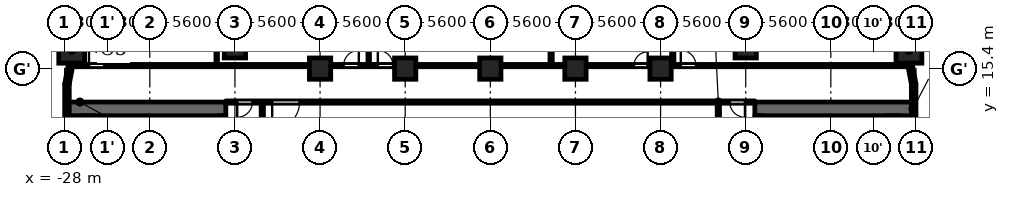
"""IFC4 building model, lengths in metres.
Left out: names, types, materials, properties, quantities, classifications, styles, units other than length and angle.
Written with IfcOpenShell. Run it as: python <this file> out.ifc"""

import sys

from ifc_helpers import new_model, si_unit, direction, frame, frame_2d, origin, origin_2d, place, context, subcontext, project, spatial, rectangle, extrude, element, fill, save


model = new_model("IFC4")
c1 = context("Model", 3, precision=1e-05, world=origin(), true_north=direction((0.0, 1.0)))
c2 = subcontext(c1, "Body", "Model", "MODEL_VIEW")
j1 = project(units=[si_unit("LENGTHUNIT", "METRE"), si_unit("PLANEANGLEUNIT", "RADIAN")], contexts=[c1])
p1 = place(None, origin())
s1 = spatial("IfcSite", under=j1, at=p1, CompositionType="ELEMENT")
p2 = place(p1, origin())
s2 = spatial("IfcBuilding", under=s1, at=p2, CompositionType="ELEMENT")
p3 = place(p2, frame((0.0, 0.0, 25.7)))
s3 = spatial("IfcBuildingStorey", under=s2, at=p3, CompositionType="ELEMENT", Elevation=25.7)
for number, where, z_axis, x_axis in (
    (1, (27.538, 16.609, 0.0), (0.0, 0.0, 1.0), (1.0, 0.0, 0.0)),
    (2, (-27.538, 16.609, 0.0), (0.0, 0.0, 1.0), (1.0, 0.0, 0.0)),
):
    element("IfcColumn", number, at=place(p3, frame(where, z_axis=z_axis, x_axis=x_axis)), inside=s3, PredefinedType="COLUMN", context=c2, shape_type="SweptSolid", body=[
        extrude(rectangle(XDim=1.7, YDim=1.7, at=origin_2d()), origin(), (0.0, 0.0, 1.0), 4.8),
    ])
for number, where, z_axis, x_axis in (
    (3, (-16.8, 16.8, 0.0), (0.0, 0.0, 1.0), (1.0, 0.0, 0.0)),
    (4, (16.8, 16.8, 0.0), (0.0, 0.0, 1.0), (1.0, 0.0, 0.0)),
    (5, (-11.2, 15.4, 0.0), (0.0, 0.0, 1.0), (1.0, 0.0, 0.0)),
    (6, (-5.6, 15.4, 0.0), (0.0, 0.0, 1.0), (1.0, 0.0, 0.0)),
    (7, (0.0, 15.4, 0.0), (0.0, 0.0, 1.0), (1.0, 0.0, 0.0)),
    (8, (5.6, 15.4, 0.0), (0.0, 0.0, 1.0), (1.0, 0.0, 0.0)),
    (9, (11.2, 15.4, 0.0), (0.0, 0.0, 1.0), (1.0, 0.0, 0.0)),
):
    element("IfcColumn", number, at=place(p3, frame(where, z_axis=z_axis, x_axis=x_axis)), inside=s3, PredefinedType="COLUMN", context=c2, shape_type="SweptSolid", body=[
        extrude(rectangle(XDim=1.4, YDim=1.4, at=origin_2d()), origin(), (0.0, 0.0, 1.0), 4.8),
    ])
p4 = place(p3, frame((27.85, 12.05, 0.0), z_axis=(0.0, 0.0, 1.0), x_axis=(0.0, 1.0, 0.0)))
e10 = element("IfcWall", 10, at=p4, inside=s3, PredefinedType="SOLIDWALL", context=c2, shape_type="SweptSolid", body=[
    extrude(rectangle(XDim=2.35, YDim=0.3, at=frame_2d((1.175, 0.0))), origin(), (0.0, 0.0, 1.0), 3.55),
])
for number, where, z_axis, x_axis in (
    (11, (27.853, 14.372, 0.0), (0.0, 0.0, 1.0), (-0.187, 0.982, 0.0)),
    (12, (-27.589, 15.753, 0.0), (0.0, 0.0, 1.0), (-0.187, -0.982, 0.0)),
):
    element("IfcWall", number, at=place(p3, frame(where, z_axis=z_axis, x_axis=x_axis)), inside=s3, PredefinedType="SOLIDWALL", context=c2, shape_type="SweptSolid", body=[
        extrude(rectangle(XDim=1.406, YDim=0.3, at=frame_2d((0.703, 0.0))), origin(), (0.0, 0.0, 1.0), 3.55),
    ])
p5 = place(p3, frame((-27.85, 14.4, 0.0), z_axis=(0.0, 0.0, 1.0), x_axis=(0.0, -1.0, 0.0)))
e13 = element("IfcWall", 13, at=p5, inside=s3, PredefinedType="SOLIDWALL", context=c2, shape_type="SweptSolid", body=[
    extrude(rectangle(XDim=2.35, YDim=0.3, at=frame_2d((1.175, 0.0))), origin(), (0.0, 0.0, 1.0), 3.55),
])
p6 = place(p3, frame((-17.4, 12.75, 0.0), z_axis=(0.0, 0.0, 1.0), x_axis=(-1.0, 0.0, 0.0)))
e14 = element("IfcWall", 14, at=p6, inside=s3, PredefinedType="SHEAR", context=c2, shape_type="SweptSolid", body=[
    extrude(rectangle(XDim=10.4, YDim=0.9, at=frame_2d((5.2, 0.0))), origin(), (0.0, 0.0, 1.0), 4.45),
])
p7 = place(p3, frame((-17.6, -12.3, 0.0), z_axis=(0.0, 0.0, 1.0), x_axis=(0.0, 1.0, 0.0)))
e15 = element("IfcWall", 15, at=p7, inside=s3, PredefinedType="SHEAR", context=c2, shape_type="SweptSolid", body=[
    extrude(rectangle(XDim=24.6, YDim=0.4, at=frame_2d((12.3, 0.0))), origin(), (0.0, 0.0, 1.0), 4.45),
])
p8 = place(p7, frame((6.0, 0.0, 0.0)))
e16 = element("IfcOpeningElement", 16, at=p8, cuts=e15, PredefinedType="OPENING", context=c2, shape_type="SweptSolid", body=[
    extrude(rectangle(XDim=1.1, YDim=2.1, at=frame_2d((0.55, 1.05))), frame((0.0, 0.21, 0.0), z_axis=(0.0, -1.0, 0.0), x_axis=(1.0, 0.0, 0.0)), (0.0, 0.0, 1.0), 0.42),
])
p9 = place(p7, frame((8.4, 0.0, 0.0)))
e17 = element("IfcOpeningElement", 17, at=p9, cuts=e15, PredefinedType="OPENING", context=c2, shape_type="SweptSolid", body=[
    extrude(rectangle(XDim=1.1, YDim=2.1, at=frame_2d((0.55, 1.05))), frame((0.0, 0.21, 0.0), z_axis=(0.0, -1.0, 0.0), x_axis=(1.0, 0.0, 0.0)), (0.0, 0.0, 1.0), 0.42),
])
p10 = place(p7, frame((10.8, 0.0, 0.0)))
e18 = element("IfcOpeningElement", 18, at=p10, cuts=e15, PredefinedType="OPENING", context=c2, shape_type="SweptSolid", body=[
    extrude(rectangle(XDim=1.1, YDim=2.1, at=frame_2d((0.55, 1.05))), frame((0.0, 0.21, 0.0), z_axis=(0.0, -1.0, 0.0), x_axis=(1.0, 0.0, 0.0)), (0.0, 0.0, 1.0), 0.42),
])
p11 = place(p7, frame((16.75, 0.0, 0.0)))
e19 = element("IfcOpeningElement", 19, at=p11, cuts=e15, PredefinedType="OPENING", context=c2, shape_type="SweptSolid", body=[
    extrude(rectangle(XDim=0.9, YDim=2.1, at=frame_2d((0.45, 1.05))), frame((0.0, 0.21, 0.0), z_axis=(0.0, -1.0, 0.0), x_axis=(1.0, 0.0, 0.0)), (0.0, 0.0, 1.0), 0.42),
])
p12 = place(p7, frame((22.8, 0.0, 0.0)))
e20 = element("IfcOpeningElement", 20, at=p12, cuts=e15, PredefinedType="OPENING", context=c2, shape_type="SweptSolid", body=[
    extrude(rectangle(XDim=1.1, YDim=2.1, at=frame_2d((0.55, 1.05))), frame((0.0, 0.21, 0.0), z_axis=(0.0, -1.0, 0.0), x_axis=(1.0, 0.0, 0.0)), (0.0, 0.0, 1.0), 0.42),
])
p13 = place(p7, frame((0.7, 0.0, 0.0)))
e21 = element("IfcOpeningElement", 21, at=p13, cuts=e15, PredefinedType="OPENING", context=c2, shape_type="SweptSolid", body=[
    extrude(rectangle(XDim=1.1, YDim=2.1, at=frame_2d((0.55, 1.05))), frame((0.0, 0.21, 0.0), z_axis=(0.0, -1.0, 0.0), x_axis=(1.0, 0.0, 0.0)), (0.0, 0.0, 1.0), 0.42),
])
p14 = place(p7, frame((12.775, 0.0, 0.0)))
e22 = element("IfcOpeningElement", 22, at=p14, cuts=e15, PredefinedType="OPENING", context=c2, shape_type="SweptSolid", body=[
    extrude(rectangle(XDim=1.8, YDim=2.1, at=frame_2d((0.9, 1.05))), frame((0.0, 0.21, 0.0), z_axis=(0.0, -1.0, 0.0), x_axis=(1.0, 0.0, 0.0)), (0.0, 0.0, 1.0), 0.42),
])
p15 = place(p3, frame((-26.55, -12.3, 0.0), z_axis=(0.0, 0.0, 1.0), x_axis=(0.0, 1.0, 0.0)))
e23 = element("IfcWall", 23, at=p15, inside=s3, PredefinedType="SHEAR", context=c2, shape_type="SweptSolid", body=[
    extrude(rectangle(XDim=24.6, YDim=0.9, at=frame_2d((12.3, 0.0))), origin(), (0.0, 0.0, 1.0), 4.45),
])
p16 = place(p3, frame((-23.55, 9.8, 0.0), z_axis=(0.0, 0.0, 1.0), x_axis=(0.0, 1.0, 0.0)))
e24 = element("IfcWall", 24, at=p16, inside=s3, PredefinedType="PARTITIONING", context=c2, shape_type="SweptSolid", body=[
    extrude(rectangle(XDim=2.5, YDim=0.2, at=frame_2d((1.25, 0.0))), origin(), (0.0, 0.0, 1.0), 4.45),
])
p17 = place(p16, frame((0.8, 0.0, 0.0)))
e25 = element("IfcOpeningElement", 25, at=p17, cuts=e24, PredefinedType="OPENING", context=c2, shape_type="SweptSolid", body=[
    extrude(rectangle(XDim=0.9, YDim=2.1, at=frame_2d((0.45, 1.05))), frame((0.0, 0.11, 0.0), z_axis=(0.0, -1.0, 0.0), x_axis=(1.0, 0.0, 0.0)), (0.0, 0.0, 1.0), 0.22),
])
p18 = place(p3, frame((17.4, 12.75, 0.0), z_axis=(0.0, 0.0, 1.0), x_axis=(1.0, 0.0, 0.0)))
e26 = element("IfcWall", 26, at=p18, inside=s3, PredefinedType="SHEAR", context=c2, shape_type="SweptSolid", body=[
    extrude(rectangle(XDim=10.4, YDim=0.9, at=frame_2d((5.2, 0.0))), origin(), (0.0, 0.0, 1.0), 4.45),
])
p19 = place(p3, frame((17.6, -12.3, 0.0), z_axis=(0.0, 0.0, 1.0), x_axis=(0.0, 1.0, 0.0)))
e27 = element("IfcWall", 27, at=p19, inside=s3, PredefinedType="SHEAR", context=c2, shape_type="SweptSolid", body=[
    extrude(rectangle(XDim=24.6, YDim=0.4, at=frame_2d((12.3, 0.0))), origin(), (0.0, 0.0, 1.0), 4.45),
])
p20 = place(p19, frame((6.0, 0.0, 0.0)))
e28 = element("IfcOpeningElement", 28, at=p20, cuts=e27, PredefinedType="OPENING", context=c2, shape_type="SweptSolid", body=[
    extrude(rectangle(XDim=1.1, YDim=2.1, at=frame_2d((0.55, 1.05))), frame((0.0, 0.21, 0.0), z_axis=(0.0, -1.0, 0.0), x_axis=(1.0, 0.0, 0.0)), (0.0, 0.0, 1.0), 0.42),
])
p21 = place(p19, frame((8.4, 0.0, 0.0)))
e29 = element("IfcOpeningElement", 29, at=p21, cuts=e27, PredefinedType="OPENING", context=c2, shape_type="SweptSolid", body=[
    extrude(rectangle(XDim=1.1, YDim=2.1, at=frame_2d((0.55, 1.05))), frame((0.0, 0.21, 0.0), z_axis=(0.0, -1.0, 0.0), x_axis=(1.0, 0.0, 0.0)), (0.0, 0.0, 1.0), 0.42),
])
p22 = place(p19, frame((10.8, 0.0, 0.0)))
e30 = element("IfcOpeningElement", 30, at=p22, cuts=e27, PredefinedType="OPENING", context=c2, shape_type="SweptSolid", body=[
    extrude(rectangle(XDim=1.1, YDim=2.1, at=frame_2d((0.55, 1.05))), frame((0.0, 0.21, 0.0), z_axis=(0.0, -1.0, 0.0), x_axis=(1.0, 0.0, 0.0)), (0.0, 0.0, 1.0), 0.42),
])
p23 = place(p19, frame((16.75, 0.0, 0.0)))
e31 = element("IfcOpeningElement", 31, at=p23, cuts=e27, PredefinedType="OPENING", context=c2, shape_type="SweptSolid", body=[
    extrude(rectangle(XDim=0.9, YDim=2.1, at=frame_2d((0.45, 1.05))), frame((0.0, 0.21, 0.0), z_axis=(0.0, -1.0, 0.0), x_axis=(1.0, 0.0, 0.0)), (0.0, 0.0, 1.0), 0.42),
])
p24 = place(p19, frame((22.8, 0.0, 0.0)))
e32 = element("IfcOpeningElement", 32, at=p24, cuts=e27, PredefinedType="OPENING", context=c2, shape_type="SweptSolid", body=[
    extrude(rectangle(XDim=1.1, YDim=2.1, at=frame_2d((0.55, 1.05))), frame((0.0, 0.21, 0.0), z_axis=(0.0, -1.0, 0.0), x_axis=(1.0, 0.0, 0.0)), (0.0, 0.0, 1.0), 0.42),
])
p25 = place(p19, frame((0.7, 0.0, 0.0)))
e33 = element("IfcOpeningElement", 33, at=p25, cuts=e27, PredefinedType="OPENING", context=c2, shape_type="SweptSolid", body=[
    extrude(rectangle(XDim=1.1, YDim=2.1, at=frame_2d((0.55, 1.05))), frame((0.0, 0.21, 0.0), z_axis=(0.0, -1.0, 0.0), x_axis=(1.0, 0.0, 0.0)), (0.0, 0.0, 1.0), 0.42),
])
p26 = place(p19, frame((12.775, 0.0, 0.0)))
e34 = element("IfcOpeningElement", 34, at=p26, cuts=e27, PredefinedType="OPENING", context=c2, shape_type="SweptSolid", body=[
    extrude(rectangle(XDim=1.8, YDim=2.1, at=frame_2d((0.9, 1.05))), frame((0.0, 0.21, 0.0), z_axis=(0.0, -1.0, 0.0), x_axis=(1.0, 0.0, 0.0)), (0.0, 0.0, 1.0), 0.42),
])
p27 = place(p3, frame((26.55, -12.3, 0.0), z_axis=(0.0, 0.0, 1.0), x_axis=(0.0, 1.0, 0.0)))
e35 = element("IfcWall", 35, at=p27, inside=s3, PredefinedType="SHEAR", context=c2, shape_type="SweptSolid", body=[
    extrude(rectangle(XDim=24.6, YDim=0.9, at=frame_2d((12.3, 0.0))), origin(), (0.0, 0.0, 1.0), 4.45),
])
p28 = place(p3, frame((23.55, 9.8, 0.0), z_axis=(0.0, 0.0, 1.0), x_axis=(0.0, 1.0, 0.0)))
e36 = element("IfcWall", 36, at=p28, inside=s3, PredefinedType="PARTITIONING", context=c2, shape_type="SweptSolid", body=[
    extrude(rectangle(XDim=2.5, YDim=0.2, at=frame_2d((1.25, 0.0))), origin(), (0.0, 0.0, 1.0), 4.45),
])
p29 = place(p28, frame((0.8, 0.0, 0.0)))
e37 = element("IfcOpeningElement", 37, at=p29, cuts=e36, PredefinedType="OPENING", context=c2, shape_type="SweptSolid", body=[
    extrude(rectangle(XDim=0.9, YDim=2.1, at=frame_2d((0.45, 1.05))), frame((0.0, 0.11, 0.0), z_axis=(0.0, -1.0, 0.0), x_axis=(1.0, 0.0, 0.0)), (0.0, 0.0, 1.0), 0.22),
])
p30 = place(p3, frame((-17.4, 13.2, 0.0), z_axis=(0.0, 0.0, 1.0), x_axis=(1.0, 0.0, 0.0)))
e38 = element("IfcWall", 38, at=p30, inside=s3, PredefinedType="PARTITIONING", context=c2, shape_type="SweptSolid", body=[
    extrude(rectangle(XDim=34.8, YDim=0.15, at=frame_2d((17.4, 0.0))), origin(), (0.0, 0.0, 1.0), 4.45),
])
p31 = place(p30, frame((3.05, 0.0, 0.0)))
e39 = element("IfcOpeningElement", 39, at=p31, cuts=e38, PredefinedType="OPENING", context=c2, shape_type="SweptSolid", body=[
    extrude(rectangle(XDim=1.8, YDim=2.1, at=frame_2d((0.9, 1.05))), frame((0.0, 0.085, 0.0), z_axis=(0.0, -1.0, 0.0), x_axis=(1.0, 0.0, 0.0)), (0.0, 0.0, 1.0), 0.17),
])
p32 = place(p30, frame((0.75, 0.0, 0.0)))
e40 = element("IfcOpeningElement", 40, at=p32, cuts=e38, PredefinedType="OPENING", context=c2, shape_type="SweptSolid", body=[
    extrude(rectangle(XDim=1.0, YDim=2.1, at=frame_2d((0.5, 1.05))), frame((0.0, 0.085, 0.0), z_axis=(0.0, -1.0, 0.0), x_axis=(1.0, 0.0, 0.0)), (0.0, 0.0, 1.0), 0.17),
])
p33 = place(p30, frame((33.15, 0.0, 0.0)))
e41 = element("IfcOpeningElement", 41, at=p33, cuts=e38, PredefinedType="OPENING", context=c2, shape_type="SweptSolid", body=[
    extrude(rectangle(XDim=1.0, YDim=2.1, at=frame_2d((0.5, 1.05))), frame((0.0, 0.085, 0.0), z_axis=(0.0, -1.0, 0.0), x_axis=(1.0, 0.0, 0.0)), (0.0, 0.0, 1.0), 0.17),
])
p34 = place(p3, frame((-27.446, 15.6, 0.0), z_axis=(0.0, 0.0, 1.0), x_axis=(1.0, 0.0, 0.0)))
e42 = element("IfcWall", 42, at=p34, inside=s3, PredefinedType="PARTITIONING", context=c2, shape_type="SweptSolid", body=[
    extrude(rectangle(XDim=54.892, YDim=0.15, at=frame_2d((27.446, 0.0))), origin(), (0.0, 0.0, 1.0), 4.45),
])
p35 = place(p34, frame((1.046, 0.0, 0.0)))
e43 = element("IfcOpeningElement", 43, at=p35, cuts=e42, PredefinedType="OPENING", context=c2, shape_type="SweptSolid", body=[
    extrude(rectangle(XDim=1.0, YDim=2.1, at=frame_2d((0.5, 1.05))), frame((0.0, 0.085, 0.0), z_axis=(0.0, -1.0, 0.0), x_axis=(1.0, 0.0, 0.0)), (0.0, 0.0, 1.0), 0.17),
])
p36 = place(p34, frame((17.796, 0.0, 0.0)))
e44 = element("IfcOpeningElement", 44, at=p36, cuts=e42, PredefinedType="OPENING", context=c2, shape_type="SweptSolid", body=[
    extrude(rectangle(XDim=1.0, YDim=2.1, at=frame_2d((0.5, 1.05))), frame((0.0, 0.085, 0.0), z_axis=(0.0, -1.0, 0.0), x_axis=(1.0, 0.0, 0.0)), (0.0, 0.0, 1.0), 0.17),
])
p37 = place(p34, frame((20.046, 0.0, 0.0)))
e45 = element("IfcOpeningElement", 45, at=p37, cuts=e42, PredefinedType="OPENING", context=c2, shape_type="SweptSolid", body=[
    extrude(rectangle(XDim=1.0, YDim=2.1, at=frame_2d((0.5, 1.05))), frame((0.0, 0.085, 0.0), z_axis=(0.0, -1.0, 0.0), x_axis=(1.0, 0.0, 0.0)), (0.0, 0.0, 1.0), 0.17),
])
p38 = place(p34, frame((36.896, 0.0, 0.0)))
e46 = element("IfcOpeningElement", 46, at=p38, cuts=e42, PredefinedType="OPENING", context=c2, shape_type="SweptSolid", body=[
    extrude(rectangle(XDim=0.9, YDim=2.1, at=frame_2d((0.45, 1.05))), frame((0.0, 0.085, 0.0), z_axis=(0.0, -1.0, 0.0), x_axis=(1.0, 0.0, 0.0)), (0.0, 0.0, 1.0), 0.17),
])
p39 = place(p34, frame((39.975, 0.0, 0.0)))
e47 = element("IfcOpeningElement", 47, at=p39, cuts=e42, PredefinedType="OPENING", context=c2, shape_type="SweptSolid", body=[
    extrude(rectangle(XDim=1.0, YDim=2.1, at=frame_2d((0.5, 1.05))), frame((0.0, 0.085, 0.0), z_axis=(0.0, -1.0, 0.0), x_axis=(1.0, 0.0, 0.0)), (0.0, 0.0, 1.0), 0.17),
])
p40 = place(p3, frame((-18.0, 15.675, 0.0), z_axis=(0.0, 0.0, 1.0), x_axis=(0.0, 1.0, 0.0)))
e48 = element("IfcWall", 48, at=p40, inside=s3, PredefinedType="PARTITIONING", context=c2, shape_type="SweptSolid", body=[
    extrude(rectangle(XDim=6.405, YDim=0.1, at=frame_2d((3.203, 0.0))), origin(), (0.0, 0.0, 1.0), 4.45),
])
p41 = place(p3, frame((-15.0, 6.769, 0.0), z_axis=(0.0, 0.0, 1.0), x_axis=(0.0, 1.0, 0.0)))
e49 = element("IfcWall", 49, at=p41, inside=s3, PredefinedType="PARTITIONING", context=c2, shape_type="SweptSolid", body=[
    extrude(rectangle(XDim=6.356, YDim=0.15, at=frame_2d((3.178, 0.0))), origin(), (0.0, 0.0, 1.0), 4.45),
])
p42 = place(p3, frame((-8.0, 15.675, 0.0), z_axis=(0.0, 0.0, 1.0), x_axis=(0.0, 1.0, 0.0)))
e50 = element("IfcWall", 50, at=p42, inside=s3, PredefinedType="PARTITIONING", context=c2, shape_type="SweptSolid", body=[
    extrude(rectangle(XDim=6.405, YDim=0.1, at=frame_2d((3.203, 0.0))), origin(), (0.0, 0.0, 1.0), 4.45),
])
p43 = place(p3, frame((4.0, 15.675, 0.0), z_axis=(0.0, 0.0, 1.0), x_axis=(0.0, 1.0, 0.0)))
e51 = element("IfcWall", 51, at=p43, inside=s3, PredefinedType="PARTITIONING", context=c2, shape_type="SweptSolid", body=[
    extrude(rectangle(XDim=6.405, YDim=0.15, at=frame_2d((3.203, 0.0))), origin(), (0.0, 0.0, 1.0), 4.45),
])
p44 = place(p3, frame((12.0, 15.675, 0.0), z_axis=(0.0, 0.0, 1.0), x_axis=(0.0, 1.0, 0.0)))
e52 = element("IfcWall", 52, at=p44, inside=s3, PredefinedType="PARTITIONING", context=c2, shape_type="SweptSolid", body=[
    extrude(rectangle(XDim=6.635, YDim=0.15, at=frame_2d((3.317, 0.0))), origin(), (0.0, 0.0, 1.0), 4.45),
])
p45 = place(p3, frame((15.0, 6.769, 0.0), z_axis=(0.0, 0.0, 1.0), x_axis=(0.0, 1.0, 0.0)))
e53 = element("IfcWall", 53, at=p45, inside=s3, PredefinedType="PARTITIONING", context=c2, shape_type="SweptSolid", body=[
    extrude(rectangle(XDim=6.356, YDim=0.15, at=frame_2d((3.178, 0.0))), origin(), (0.0, 0.0, 1.0), 4.45),
])
p46 = place(p31, origin())
e54 = element("IfcDoor", 54, at=p46, inside=s3, OperationType="SINGLE_SWING_LEFT", PredefinedType="DOOR", context=c2, shape_type="SweptSolid", body=[
    extrude(rectangle(XDim=1.8, YDim=2.1, at=frame_2d((0.9, 1.05))), frame((0.0, 0.025, 0.0), z_axis=(0.0, -1.0, 0.0), x_axis=(1.0, 0.0, 0.0)), (0.0, 0.0, 1.0), 0.05),
])
fill(e39, e54)
p47 = place(p32, origin())
e55 = element("IfcDoor", 55, at=p47, inside=s3, OperationType="SINGLE_SWING_LEFT", PredefinedType="DOOR", context=c2, shape_type="SweptSolid", body=[
    extrude(rectangle(XDim=1.0, YDim=2.1, at=frame_2d((0.5, 1.05))), frame((0.0, 0.025, 0.0), z_axis=(0.0, -1.0, 0.0), x_axis=(1.0, 0.0, 0.0)), (0.0, 0.0, 1.0), 0.05),
])
fill(e40, e55)
p48 = place(p33, origin())
e56 = element("IfcDoor", 56, at=p48, inside=s3, OperationType="SINGLE_SWING_RIGHT", PredefinedType="DOOR", context=c2, shape_type="SweptSolid", body=[
    extrude(rectangle(XDim=1.0, YDim=2.1, at=frame_2d((0.5, 1.05))), frame((0.0, 0.025, 0.0), z_axis=(0.0, -1.0, 0.0), x_axis=(1.0, 0.0, 0.0)), (0.0, 0.0, 1.0), 0.05),
])
fill(e41, e56)
p49 = place(p35, origin())
e57 = element("IfcDoor", 57, at=p49, inside=s3, OperationType="SINGLE_SWING_RIGHT", PredefinedType="DOOR", context=c2, shape_type="SweptSolid", body=[
    extrude(rectangle(XDim=1.0, YDim=2.1, at=frame_2d((0.5, 1.05))), frame((0.0, 0.025, 0.0), z_axis=(0.0, -1.0, 0.0), x_axis=(1.0, 0.0, 0.0)), (0.0, 0.0, 1.0), 0.05),
])
fill(e43, e57)
p50 = place(p36, origin())
e58 = element("IfcDoor", 58, at=p50, inside=s3, OperationType="SINGLE_SWING_LEFT", PredefinedType="DOOR", context=c2, shape_type="SweptSolid", body=[
    extrude(rectangle(XDim=1.0, YDim=2.1, at=frame_2d((0.5, 1.05))), frame((0.0, 0.025, 0.0), z_axis=(0.0, -1.0, 0.0), x_axis=(1.0, 0.0, 0.0)), (0.0, 0.0, 1.0), 0.05),
])
fill(e44, e58)
p51 = place(p37, origin())
e59 = element("IfcDoor", 59, at=p51, inside=s3, OperationType="SINGLE_SWING_RIGHT", PredefinedType="DOOR", context=c2, shape_type="SweptSolid", body=[
    extrude(rectangle(XDim=1.0, YDim=2.1, at=frame_2d((0.5, 1.05))), frame((0.0, 0.025, 0.0), z_axis=(0.0, -1.0, 0.0), x_axis=(1.0, 0.0, 0.0)), (0.0, 0.0, 1.0), 0.05),
])
fill(e45, e59)
p52 = place(p38, origin())
e60 = element("IfcDoor", 60, at=p52, inside=s3, OperationType="SINGLE_SWING_LEFT", PredefinedType="DOOR", context=c2, shape_type="SweptSolid", body=[
    extrude(rectangle(XDim=0.9, YDim=2.1, at=frame_2d((0.45, 1.05))), frame((0.0, 0.025, 0.0), z_axis=(0.0, -1.0, 0.0), x_axis=(1.0, 0.0, 0.0)), (0.0, 0.0, 1.0), 0.05),
])
fill(e46, e60)
p53 = place(p39, origin())
e61 = element("IfcDoor", 61, at=p53, inside=s3, OperationType="SINGLE_SWING_RIGHT", PredefinedType="DOOR", context=c2, shape_type="SweptSolid", body=[
    extrude(rectangle(XDim=1.0, YDim=2.1, at=frame_2d((0.5, 1.05))), frame((0.0, 0.025, 0.0), z_axis=(0.0, -1.0, 0.0), x_axis=(1.0, 0.0, 0.0)), (0.0, 0.0, 1.0), 0.05),
])
fill(e47, e61)
save(model, sys.argv[1])
